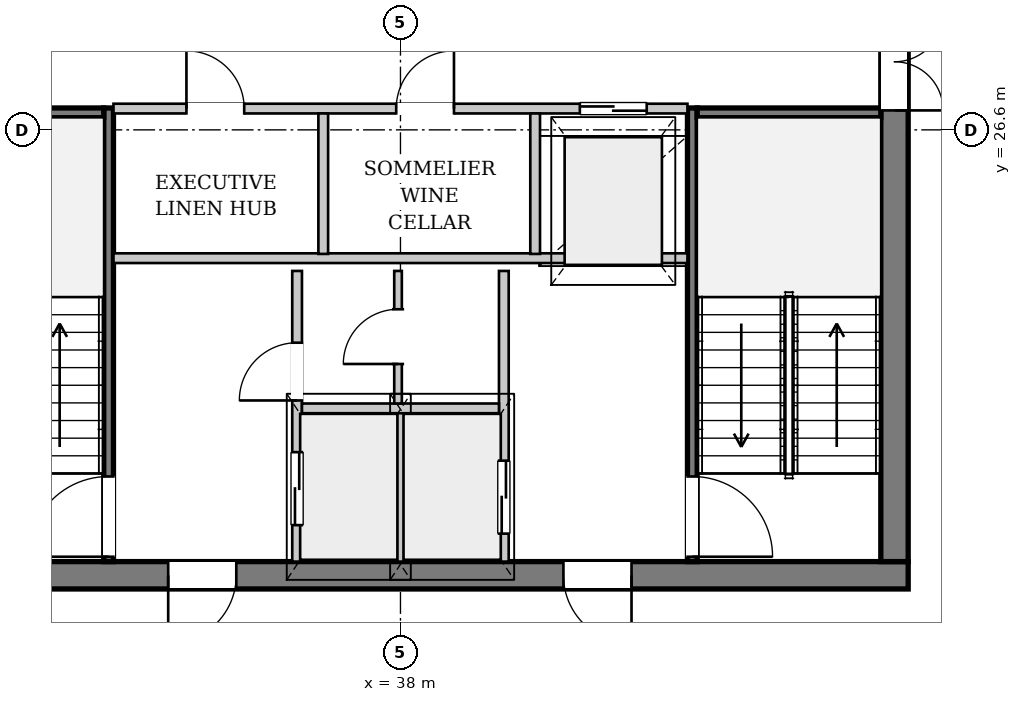
"""IFC4 building model, lengths in metres.
Left out: names, types, materials, properties, quantities, classifications, styles, units other than length and angle.
Written with IfcOpenShell. Run it as: python <this file> out.ifc"""

import sys

from ifc_helpers import new_model, si_unit, direction, frame, frame_2d, origin, place, context, subcontext, project, spatial, rectangle, extrude, source, transform, mapped, element, fill, save


model = new_model("IFC4")
c1 = context("Model", 3, precision=1e-05, world=origin(), true_north=direction((0.0, 1.0)))
c2 = subcontext(c1, "Body", "Model", "MODEL_VIEW")
j1 = project(units=[si_unit("LENGTHUNIT", "METRE"), si_unit("PLANEANGLEUNIT", "RADIAN")], contexts=[c1])
p1 = place(None, origin())
s1 = spatial("IfcSite", under=j1, at=p1, CompositionType="ELEMENT")
p2 = place(p1, origin())
s2 = spatial("IfcBuilding", under=s1, at=p2, CompositionType="ELEMENT")
p3 = place(p2, frame((0.0, 0.0, 245.3)))
s3 = spatial("IfcBuildingStorey", under=s2, at=p3, CompositionType="ELEMENT", Elevation=245.3)
p4 = place(p3, frame((52.257, 25.693, 0.0), z_axis=(0.0, 0.0, 1.0), x_axis=(-0.337512626034, -0.941321001183, 0.0)))
e1 = element("IfcWall", 1, at=p4, inside=s3, PredefinedType="SOLIDWALL", context=c2, shape_type="SweptSolid", body=[
    extrude(rectangle(XDim=22.663, YDim=0.32, at=frame_2d((11.332, 0.0))), origin(), (0.0, 0.0, 1.0), 2.872),
])
p5 = place(p4, frame((6.502, 0.0, 0.0)))
e2 = element("IfcOpeningElement", 2, at=p5, cuts=e1, PredefinedType="OPENING", context=c2, shape_type="SweptSolid", body=[
    extrude(rectangle(XDim=1.5, YDim=2.3, at=frame_2d((0.75, 1.15))), frame((0.0, 0.17, 0.0), z_axis=(0.0, -1.0, 0.0), x_axis=(1.0, 0.0, 0.0)), (0.0, 0.0, 1.0), 0.34),
])
p6 = place(p4, frame((15.471, 0.0, 0.402)))
e3 = element("IfcOpeningElement", 3, at=p6, cuts=e1, PredefinedType="OPENING", context=c2, shape_type="SweptSolid", body=[
    extrude(rectangle(XDim=2.6, YDim=2.35, at=frame_2d((1.3, 1.175))), frame((0.0, 0.17, 0.0), z_axis=(0.0, -1.0, 0.0), x_axis=(1.0, 0.0, 0.0)), (0.0, 0.0, 1.0), 0.34),
])
p7 = place(p3, frame((46.35, 19.275, 0.0), z_axis=(0.0, 0.0, 1.0), x_axis=(-1.0, 0.0, 0.0)))
e4 = element("IfcWall", 4, at=p7, inside=s3, PredefinedType="SHEAR", context=c2, shape_type="SweptSolid", body=[
    extrude(rectangle(XDim=16.7, YDim=0.45, at=frame_2d((8.35, 0.0))), origin(), (0.0, 0.0, 1.0), 3.38),
])
p8 = place(p7, frame((4.55, 0.0, 0.0)))
e5 = element("IfcOpeningElement", 5, at=p8, cuts=e4, PredefinedType="OPENING", context=c2, shape_type="SweptSolid", body=[
    extrude(rectangle(XDim=1.12, YDim=2.25, at=frame_2d((0.56, 1.125))), frame((0.0, 0.235, 0.0), z_axis=(0.0, -1.0, 0.0), x_axis=(1.0, 0.0, 0.0)), (0.0, 0.0, 1.0), 0.47),
])
p9 = place(p7, frame((11.05, 0.0, 0.0)))
e6 = element("IfcOpeningElement", 6, at=p9, cuts=e4, PredefinedType="OPENING", context=c2, shape_type="SweptSolid", body=[
    extrude(rectangle(XDim=1.12, YDim=2.25, at=frame_2d((0.56, 1.125))), frame((0.0, 0.235, 0.0), z_axis=(0.0, -1.0, 0.0), x_axis=(1.0, 0.0, 0.0)), (0.0, 0.0, 1.0), 0.47),
])
p10 = place(p3, frame((46.125, 33.7, 0.0), z_axis=(0.0, 0.0, 1.0), x_axis=(0.0, -1.0, 0.0)))
e7 = element("IfcWall", 7, at=p10, inside=s3, PredefinedType="SHEAR", context=c2, shape_type="SweptSolid", body=[
    extrude(rectangle(XDim=14.2, YDim=0.45, at=frame_2d((7.1, 0.0))), origin(), (0.0, 0.0, 1.0), 3.38),
])
p11 = place(p10, frame((5.18, 0.0, 0.0)))
e8 = element("IfcOpeningElement", 8, at=p11, cuts=e7, PredefinedType="OPENING", context=c2, shape_type="SweptSolid", body=[
    extrude(rectangle(XDim=1.6, YDim=2.2, at=frame_2d((0.8, 1.1))), frame((0.0, 0.235, 0.0), z_axis=(0.0, -1.0, 0.0), x_axis=(1.0, 0.0, 0.0)), (0.0, 0.0, 1.0), 0.47),
])
p12 = place(p10, frame((2.05, 0.0, 0.0)))
e9 = element("IfcOpeningElement", 9, at=p12, cuts=e7, PredefinedType="OPENING", context=c2, shape_type="SweptSolid", body=[
    extrude(rectangle(XDim=0.95, YDim=2.1, at=frame_2d((0.475, 1.05))), frame((0.0, 0.235, 0.0), z_axis=(0.0, -1.0, 0.0), x_axis=(1.0, 0.0, 0.0)), (0.0, 0.0, 1.0), 0.47),
])
p13 = place(p3, frame((33.2, 19.5, 0.0), z_axis=(0.0, 0.0, 1.0), x_axis=(0.0, 1.0, 0.0)))
e10 = element("IfcWall", 10, at=p13, inside=s3, PredefinedType="PARTITIONING", context=c2, shape_type="SweptSolid", body=[
    extrude(rectangle(XDim=7.46, YDim=0.16, at=frame_2d((3.73, 0.0))), origin(), (0.0, 0.0, 1.0), 3.38),
])
p14 = place(p13, frame((0.08, 0.0, 0.0)))
e11 = element("IfcOpeningElement", 11, at=p14, cuts=e10, PredefinedType="OPENING", context=c2, shape_type="SweptSolid", body=[
    extrude(rectangle(XDim=1.32, YDim=2.2, at=frame_2d((0.66, 1.1))), frame((0.0, 0.09, 0.0), z_axis=(0.0, -1.0, 0.0), x_axis=(1.0, 0.0, 0.0)), (0.0, 0.0, 1.0), 0.18),
])
p15 = place(p3, frame((30.1, 26.88, 0.0), z_axis=(0.0, 0.0, 1.0), x_axis=(1.0, 0.0, 0.0)))
e12 = element("IfcWall", 12, at=p15, inside=s3, PredefinedType="PARTITIONING", context=c2, shape_type="SweptSolid", body=[
    extrude(rectangle(XDim=3.02, YDim=0.16, at=frame_2d((1.51, 0.0))), origin(), (0.0, 0.0, 1.0), 3.38),
])
p16 = place(p3, frame((42.8, 26.96, 0.0), z_axis=(0.0, 0.0, 1.0), x_axis=(0.0, -1.0, 0.0)))
e13 = element("IfcWall", 13, at=p16, inside=s3, PredefinedType="PARTITIONING", context=c2, shape_type="SweptSolid", body=[
    extrude(rectangle(XDim=7.46, YDim=0.16, at=frame_2d((3.73, 0.0))), origin(), (0.0, 0.0, 1.0), 3.38),
])
p17 = place(p16, frame((6.06, 0.0, 0.0)))
e14 = element("IfcOpeningElement", 14, at=p17, cuts=e13, PredefinedType="OPENING", context=c2, shape_type="SweptSolid", body=[
    extrude(rectangle(XDim=1.32, YDim=2.2, at=frame_2d((0.66, 1.1))), frame((0.0, 0.09, 0.0), z_axis=(0.0, -1.0, 0.0), x_axis=(1.0, 0.0, 0.0)), (0.0, 0.0, 1.0), 0.18),
])
p18 = place(p3, frame((42.88, 26.88, 0.0), z_axis=(0.0, 0.0, 1.0), x_axis=(1.0, 0.0, 0.0)))
e15 = element("IfcWall", 15, at=p18, inside=s3, PredefinedType="PARTITIONING", context=c2, shape_type="SweptSolid", body=[
    extrude(rectangle(XDim=3.02, YDim=0.16, at=frame_2d((1.51, 0.0))), origin(), (0.0, 0.0, 1.0), 3.38),
])
p19 = place(p3, frame((36.3, 19.5, 0.0), z_axis=(0.0, 0.0, 1.0), x_axis=(0.0, 1.0, 0.0)))
e16 = element("IfcWall", 16, at=p19, inside=s3, PredefinedType="PARTITIONING", context=c2, shape_type="SweptSolid", body=[
    extrude(rectangle(XDim=4.78, YDim=0.16, at=frame_2d((2.39, 0.0))), origin(), (0.0, 0.0, 1.0), 3.38),
])
p20 = place(p19, frame((0.6, 0.0, 0.0)))
e17 = element("IfcOpeningElement", 17, at=p20, cuts=e16, PredefinedType="OPENING", context=c2, shape_type="SweptSolid", body=[
    extrude(rectangle(XDim=1.2, YDim=2.2, at=frame_2d((0.6, 1.1))), frame((0.0, 0.09, 0.0), z_axis=(0.0, -1.0, 0.0), x_axis=(1.0, 0.0, 0.0)), (0.0, 0.0, 1.0), 0.18),
])
p21 = place(p19, frame((2.65, 0.0, 0.0)))
e18 = element("IfcOpeningElement", 18, at=p21, cuts=e16, PredefinedType="OPENING", context=c2, shape_type="SweptSolid", body=[
    extrude(rectangle(XDim=0.95, YDim=2.1, at=frame_2d((0.475, 1.05))), frame((0.0, 0.09, 0.0), z_axis=(0.0, -1.0, 0.0), x_axis=(1.0, 0.0, 0.0)), (0.0, 0.0, 1.0), 0.18),
])
p22 = place(p3, frame((39.7, 24.28, 0.0), z_axis=(0.0, 0.0, 1.0), x_axis=(0.0, -1.0, 0.0)))
e19 = element("IfcWall", 19, at=p22, inside=s3, PredefinedType="PARTITIONING", context=c2, shape_type="SweptSolid", body=[
    extrude(rectangle(XDim=4.78, YDim=0.16, at=frame_2d((2.39, 0.0))), origin(), (0.0, 0.0, 1.0), 3.38),
])
p23 = place(p22, frame((3.12, 0.0, 0.0)))
e20 = element("IfcOpeningElement", 20, at=p23, cuts=e19, PredefinedType="OPENING", context=c2, shape_type="SweptSolid", body=[
    extrude(rectangle(XDim=1.2, YDim=2.2, at=frame_2d((0.6, 1.1))), frame((0.0, 0.09, 0.0), z_axis=(0.0, -1.0, 0.0), x_axis=(1.0, 0.0, 0.0)), (0.0, 0.0, 1.0), 0.18),
])
p24 = place(p3, frame((38.0, 19.5, 0.0), z_axis=(0.0, 0.0, 1.0), x_axis=(0.0, 1.0, 0.0)))
e21 = element("IfcWall", 21, at=p24, inside=s3, PredefinedType="PARTITIONING", context=c2, shape_type="SweptSolid", body=[
    extrude(rectangle(XDim=2.46, YDim=0.125, at=frame_2d((1.23, 0.0))), origin(), (0.0, 0.0, 1.0), 3.38),
])
p25 = place(p3, frame((36.38, 22.02, 0.0), z_axis=(0.0, 0.0, 1.0), x_axis=(1.0, 0.0, 0.0)))
e22 = element("IfcWall", 22, at=p25, inside=s3, PredefinedType="PARTITIONING", context=c2, shape_type="SweptSolid", body=[
    extrude(rectangle(XDim=3.24, YDim=0.16, at=frame_2d((1.62, 0.0))), origin(), (0.0, 0.0, 1.0), 3.38),
])
p26 = place(p3, frame((33.28, 24.49, 0.0), z_axis=(0.0, 0.0, 1.0), x_axis=(1.0, 0.0, 0.0)))
e23 = element("IfcWall", 23, at=p26, inside=s3, PredefinedType="PARTITIONING", context=c2, shape_type="SweptSolid", body=[
    extrude(rectangle(XDim=9.44, YDim=0.16, at=frame_2d((4.72, 0.0))), origin(), (0.0, 0.0, 1.0), 3.38),
])
p27 = place(p3, frame((37.96, 22.1, 0.0), z_axis=(0.0, 0.0, 1.0), x_axis=(0.0, 1.0, 0.0)))
e24 = element("IfcWall", 24, at=p27, inside=s3, PredefinedType="PARTITIONING", context=c2, shape_type="SweptSolid", body=[
    extrude(rectangle(XDim=2.18, YDim=0.125, at=frame_2d((1.09, 0.0))), origin(), (0.0, 0.0, 1.0), 3.38),
])
p28 = place(p27, frame((0.65, 0.0, 0.0)))
e25 = element("IfcOpeningElement", 25, at=p28, cuts=e24, PredefinedType="OPENING", context=c2, shape_type="SweptSolid", body=[
    extrude(rectangle(XDim=0.9, YDim=2.1, at=frame_2d((0.45, 1.05))), frame((0.0, 0.073, 0.0), z_axis=(0.0, -1.0, 0.0), x_axis=(1.0, 0.0, 0.0)), (0.0, 0.0, 1.0), 0.145),
])
p29 = place(p3, frame((33.28, 26.95, 0.0), z_axis=(0.0, 0.0, 1.0), x_axis=(1.0, 0.0, 0.0)))
e26 = element("IfcWall", 26, at=p29, inside=s3, PredefinedType="PARTITIONING", context=c2, shape_type="SweptSolid", body=[
    extrude(rectangle(XDim=9.44, YDim=0.16, at=frame_2d((4.72, 0.0))), origin(), (0.0, 0.0, 1.0), 3.38),
])
p30 = place(p29, frame((1.2, 0.0, 0.0)))
e27 = element("IfcOpeningElement", 27, at=p30, cuts=e26, PredefinedType="OPENING", context=c2, shape_type="SweptSolid", body=[
    extrude(rectangle(XDim=0.95, YDim=2.1, at=frame_2d((0.475, 1.05))), frame((0.0, 0.09, 0.0), z_axis=(0.0, -1.0, 0.0), x_axis=(1.0, 0.0, 0.0)), (0.0, 0.0, 1.0), 0.18),
])
p31 = place(p29, frame((4.65, 0.0, 0.0)))
e28 = element("IfcOpeningElement", 28, at=p31, cuts=e26, PredefinedType="OPENING", context=c2, shape_type="SweptSolid", body=[
    extrude(rectangle(XDim=0.95, YDim=2.1, at=frame_2d((0.475, 1.05))), frame((0.0, 0.09, 0.0), z_axis=(0.0, -1.0, 0.0), x_axis=(1.0, 0.0, 0.0)), (0.0, 0.0, 1.0), 0.18),
])
p32 = place(p29, frame((7.67, 0.0, 0.0)))
e29 = element("IfcOpeningElement", 29, at=p32, cuts=e26, PredefinedType="OPENING", context=c2, shape_type="SweptSolid", body=[
    extrude(rectangle(XDim=1.1, YDim=2.2, at=frame_2d((0.55, 1.1))), frame((0.0, 0.09, 0.0), z_axis=(0.0, -1.0, 0.0), x_axis=(1.0, 0.0, 0.0)), (0.0, 0.0, 1.0), 0.18),
])
for number, where, z_axis, x_axis in (
    (30, (36.73, 24.56, 0.0), (0.0, 0.0, 1.0), (0.0, 1.0, 0.0)),
    (31, (40.215, 24.56, 0.0), (0.0, 0.0, 1.0), (0.0, 1.0, 0.0)),
):
    element("IfcWall", number, at=place(p3, frame(where, z_axis=z_axis, x_axis=x_axis)), inside=s3, PredefinedType="PARTITIONING", context=c2, shape_type="SweptSolid", body=[
        extrude(rectangle(XDim=2.31, YDim=0.16, at=frame_2d((1.155, 0.0))), origin(), (0.0, 0.0, 1.0), 3.38),
    ])
m1 = source(origin(), c2, "Body", "SweptSolid", [
    extrude(rectangle(XDim=1.12, YDim=2.25, at=frame_2d((0.56, 1.125))), frame((0.0, 0.025, 0.0), z_axis=(0.0, -1.0, 0.0), x_axis=(1.0, 0.0, 0.0)), (0.0, 0.0, 1.0), 0.05),
])
p33 = place(p8, origin())
e32 = element("IfcDoor", 32, at=p33, inside=s3, OperationType="SINGLE_SWING_LEFT", PredefinedType="DOOR", context=c2, shape_type="MappedRepresentation", body=[
    mapped(m1, transform((0.0, 0.0, 0.0), x_axis=(1.0, 0.0, 0.0), y_axis=(0.0, 1.0, 0.0), z_axis=(0.0, 0.0, 1.0), scale=1.0)),
])
fill(e5, e32)
p34 = place(p9, origin())
e33 = element("IfcDoor", 33, at=p34, inside=s3, OperationType="SINGLE_SWING_RIGHT", PredefinedType="DOOR", context=c2, shape_type="MappedRepresentation", body=[
    mapped(m1, transform((0.0, 0.0, 0.0), x_axis=(1.0, 0.0, 0.0), y_axis=(0.0, 1.0, 0.0), z_axis=(0.0, 0.0, 1.0), scale=1.0)),
])
fill(e6, e33)
m2 = source(origin(), c2, "Body", "SweptSolid", [
    extrude(rectangle(XDim=1.6, YDim=2.2, at=frame_2d((0.8, 1.1))), frame((0.0, 0.025, 0.0), z_axis=(0.0, -1.0, 0.0), x_axis=(1.0, 0.0, 0.0)), (0.0, 0.0, 1.0), 0.05),
])
p35 = place(p11, origin())
e34 = element("IfcDoor", 34, at=p35, inside=s3, OperationType="DOUBLE_DOOR_SINGLE_SWING", PredefinedType="DOOR", context=c2, shape_type="MappedRepresentation", body=[
    mapped(m2, transform((0.0, 0.0, 0.0), x_axis=(1.0, 0.0, 0.0), y_axis=(0.0, 1.0, 0.0), z_axis=(0.0, 0.0, 1.0), scale=1.0)),
])
fill(e8, e34)
m3 = source(origin(), c2, "Body", "SweptSolid", [
    extrude(rectangle(XDim=1.32, YDim=2.2, at=frame_2d((0.66, 1.1))), frame((0.0, 0.025, 0.0), z_axis=(0.0, -1.0, 0.0), x_axis=(1.0, 0.0, 0.0)), (0.0, 0.0, 1.0), 0.05),
])
p36 = place(p14, origin())
e35 = element("IfcDoor", 35, at=p36, inside=s3, OperationType="SINGLE_SWING_LEFT", PredefinedType="DOOR", context=c2, shape_type="MappedRepresentation", body=[
    mapped(m3, transform((0.0, 0.0, 0.0), x_axis=(1.0, 0.0, 0.0), y_axis=(0.0, 1.0, 0.0), z_axis=(0.0, 0.0, 1.0), scale=1.0)),
])
fill(e11, e35)
p37 = place(p17, origin())
e36 = element("IfcDoor", 36, at=p37, inside=s3, OperationType="SINGLE_SWING_RIGHT", PredefinedType="DOOR", context=c2, shape_type="MappedRepresentation", body=[
    mapped(m3, transform((0.0, 0.0, 0.0), x_axis=(1.0, 0.0, 0.0), y_axis=(0.0, 1.0, 0.0), z_axis=(0.0, 0.0, 1.0), scale=1.0)),
])
fill(e14, e36)
m4 = source(origin(), c2, "Body", "SweptSolid", [
    extrude(rectangle(XDim=1.2, YDim=2.2, at=frame_2d((0.6, 1.1))), frame((0.0, 0.025, 0.0), z_axis=(0.0, -1.0, 0.0), x_axis=(1.0, 0.0, 0.0)), (0.0, 0.0, 1.0), 0.05),
])
p38 = place(p20, origin())
e37 = element("IfcDoor", 37, at=p38, inside=s3, OperationType="DOUBLE_DOOR_SLIDING", PredefinedType="DOOR", context=c2, shape_type="MappedRepresentation", body=[
    mapped(m4, transform((0.0, 0.0, 0.0), x_axis=(1.0, 0.0, 0.0), y_axis=(0.0, 1.0, 0.0), z_axis=(0.0, 0.0, 1.0), scale=1.0)),
])
fill(e17, e37)
m5 = source(origin(), c2, "Body", "SweptSolid", [
    extrude(rectangle(XDim=0.95, YDim=2.1, at=frame_2d((0.475, 1.05))), frame((0.0, 0.025, 0.0), z_axis=(0.0, -1.0, 0.0), x_axis=(1.0, 0.0, 0.0)), (0.0, 0.0, 1.0), 0.05),
])
p39 = place(p21, origin())
e38 = element("IfcDoor", 38, at=p39, inside=s3, OperationType="SINGLE_SWING_LEFT", PredefinedType="DOOR", context=c2, shape_type="MappedRepresentation", body=[
    mapped(m5, transform((0.0, 0.0, 0.0), x_axis=(1.0, 0.0, 0.0), y_axis=(0.0, 1.0, 0.0), z_axis=(0.0, 0.0, 1.0), scale=1.0)),
])
fill(e18, e38)
m6 = source(origin(), c2, "Body", "SweptSolid", [
    extrude(rectangle(XDim=0.9, YDim=2.1, at=frame_2d((0.45, 1.05))), frame((0.0, 0.025, 0.0), z_axis=(0.0, -1.0, 0.0), x_axis=(1.0, 0.0, 0.0)), (0.0, 0.0, 1.0), 0.05),
])
p40 = place(p28, origin())
e39 = element("IfcDoor", 39, at=p40, inside=s3, OperationType="SINGLE_SWING_LEFT", PredefinedType="DOOR", context=c2, shape_type="MappedRepresentation", body=[
    mapped(m6, transform((0.0, 0.0, 0.0), x_axis=(1.0, 0.0, 0.0), y_axis=(0.0, 1.0, 0.0), z_axis=(0.0, 0.0, 1.0), scale=1.0)),
])
fill(e25, e39)
p41 = place(p23, origin())
e40 = element("IfcDoor", 40, at=p41, inside=s3, OperationType="DOUBLE_DOOR_SLIDING", PredefinedType="DOOR", context=c2, shape_type="MappedRepresentation", body=[
    mapped(m4, transform((0.0, 0.0, 0.0), x_axis=(1.0, 0.0, 0.0), y_axis=(0.0, 1.0, 0.0), z_axis=(0.0, 0.0, 1.0), scale=1.0)),
])
fill(e20, e40)
p42 = place(p30, origin())
e41 = element("IfcDoor", 41, at=p42, inside=s3, OperationType="SINGLE_SWING_LEFT", PredefinedType="DOOR", context=c2, shape_type="MappedRepresentation", body=[
    mapped(m5, transform((0.0, 0.0, 0.0), x_axis=(1.0, 0.0, 0.0), y_axis=(0.0, 1.0, 0.0), z_axis=(0.0, 0.0, 1.0), scale=1.0)),
])
fill(e27, e41)
p43 = place(p31, origin())
e42 = element("IfcDoor", 42, at=p43, inside=s3, OperationType="SINGLE_SWING_RIGHT", PredefinedType="DOOR", context=c2, shape_type="MappedRepresentation", body=[
    mapped(m5, transform((0.0, 0.0, 0.0), x_axis=(1.0, 0.0, 0.0), y_axis=(0.0, 1.0, 0.0), z_axis=(0.0, 0.0, 1.0), scale=1.0)),
])
fill(e28, e42)
m7 = source(origin(), c2, "Body", "SweptSolid", [
    extrude(rectangle(XDim=1.1, YDim=2.2, at=frame_2d((0.55, 1.1))), frame((0.0, 0.025, 0.0), z_axis=(0.0, -1.0, 0.0), x_axis=(1.0, 0.0, 0.0)), (0.0, 0.0, 1.0), 0.05),
])
p44 = place(p32, origin())
e43 = element("IfcDoor", 43, at=p44, inside=s3, OperationType="DOUBLE_DOOR_SLIDING", PredefinedType="DOOR", context=c2, shape_type="MappedRepresentation", body=[
    mapped(m7, transform((0.0, 0.0, 0.0), x_axis=(1.0, 0.0, 0.0), y_axis=(0.0, 1.0, 0.0), z_axis=(0.0, 0.0, 1.0), scale=1.0)),
])
fill(e29, e43)
save(model, sys.argv[1])
